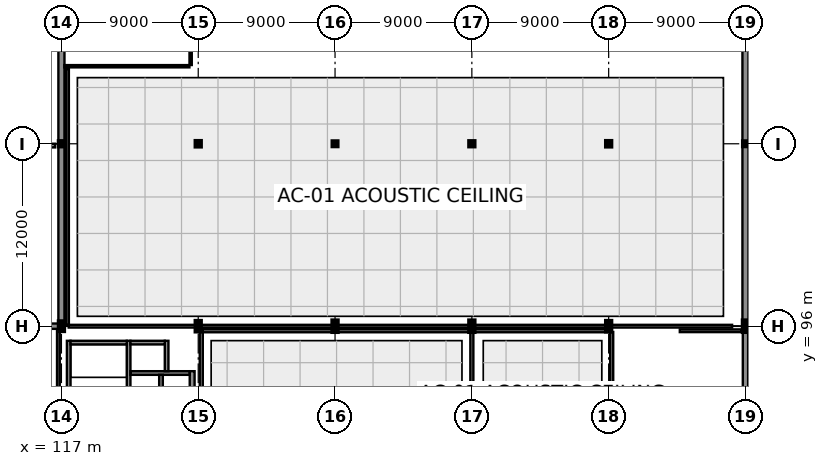
"""IFC4 building model, lengths in metres.
Left out: names, types, materials, properties, quantities, classifications, styles, units other than length and angle.
Written with IfcOpenShell. Run it as: python <this file> out.ifc"""

import sys

from ifc_helpers import new_model, si_unit, direction, frame, frame_2d, origin, origin_2d, place, context, subcontext, project, spatial, rectangle, i_section, extrude, element, fill, save


model = new_model("IFC4")
c1 = context("Model", 3, precision=1e-05, world=origin(), true_north=direction((0.0, 1.0)))
c2 = subcontext(c1, "Body", "Model", "MODEL_VIEW")
j1 = project(units=[si_unit("LENGTHUNIT", "METRE"), si_unit("PLANEANGLEUNIT", "RADIAN")], contexts=[c1])
p1 = place(None, origin())
s1 = spatial("IfcSite", under=j1, at=p1, CompositionType="ELEMENT")
p2 = place(p1, origin())
s2 = spatial("IfcBuilding", under=s1, at=p2, CompositionType="ELEMENT")
p3 = place(p2, origin())
s3 = spatial("IfcBuildingStorey", under=s2, at=p3, CompositionType="ELEMENT", Elevation=0.0)
p4 = place(p3, frame((117.0, 96.0, 0.0), z_axis=(0.0, 0.0, 1.0), x_axis=(1.0, 0.0, 0.0)))
e1 = element("IfcColumn", 1, at=p4, inside=s3, PredefinedType="COLUMN", context=c2, shape_type="SweptSolid", body=[
    extrude(i_section(OverallWidth=0.3, OverallDepth=0.6, WebThickness=0.015, FlangeThickness=0.03, at=origin_2d()), origin(), (0.0, 0.0, 1.0), 5.4),
])
p5 = place(p3, frame((117.0, 108.0, 0.0), z_axis=(0.0, 0.0, 1.0), x_axis=(1.0, 0.0, 0.0)))
e2 = element("IfcColumn", 2, at=p5, inside=s3, PredefinedType="COLUMN", context=c2, shape_type="SweptSolid", body=[
    extrude(i_section(OverallWidth=0.3, OverallDepth=0.3, WebThickness=0.011, FlangeThickness=0.019, at=origin_2d()), origin(), (0.0, 0.0, 1.0), 5.4),
])
p6 = place(p3, frame((126.0, 96.0, 0.0), z_axis=(0.0, 0.0, 1.0), x_axis=(0.0, 1.0, 0.0)))
e3 = element("IfcColumn", 3, at=p6, inside=s3, PredefinedType="COLUMN", context=c2, shape_type="SweptSolid", body=[
    extrude(i_section(OverallWidth=0.3, OverallDepth=0.65, WebThickness=0.016, FlangeThickness=0.031, at=origin_2d()), origin(), (0.0, 0.0, 1.0), 5.4),
])
p7 = place(p3, frame((126.0, 108.0, 0.0), z_axis=(0.0, 0.0, 1.0), x_axis=(1.0, 0.0, 0.0)))
e4 = element("IfcColumn", 4, at=p7, inside=s3, PredefinedType="COLUMN", context=c2, shape_type="SweptSolid", body=[
    extrude(i_section(OverallWidth=0.3, OverallDepth=0.32, WebThickness=0.011, FlangeThickness=0.021, at=origin_2d()), origin(), (0.0, 0.0, 1.0), 5.4),
])
p8 = place(p3, frame((135.0, 96.0, 0.0), z_axis=(0.0, 0.0, 1.0), x_axis=(1.0, 0.0, 0.0)))
e5 = element("IfcColumn", 5, at=p8, inside=s3, PredefinedType="COLUMN", context=c2, shape_type="SweptSolid", body=[
    extrude(i_section(OverallWidth=0.304, OverallDepth=0.716, WebThickness=0.021, FlangeThickness=0.04, at=origin_2d()), origin(), (0.0, 0.0, 1.0), 5.4),
])
p9 = place(p3, frame((135.0, 108.0, 0.0), z_axis=(0.0, 0.0, 1.0), x_axis=(1.0, 0.0, 0.0)))
e6 = element("IfcColumn", 6, at=p9, inside=s3, PredefinedType="COLUMN", context=c2, shape_type="SweptSolid", body=[
    extrude(i_section(OverallWidth=0.28, OverallDepth=0.28, WebThickness=0.01, FlangeThickness=0.018, at=origin_2d()), origin(), (0.0, 0.0, 1.0), 5.4),
])
p10 = place(p3, frame((144.0, 96.0, 0.0), z_axis=(0.0, 0.0, 1.0), x_axis=(1.0, 0.0, 0.0)))
e7 = element("IfcColumn", 7, at=p10, inside=s3, PredefinedType="COLUMN", context=c2, shape_type="SweptSolid", body=[
    extrude(i_section(OverallWidth=0.304, OverallDepth=0.716, WebThickness=0.021, FlangeThickness=0.04, at=origin_2d()), origin(), (0.0, 0.0, 1.0), 5.4),
])
p11 = place(p3, frame((144.0, 108.0, 0.0), z_axis=(0.0, 0.0, 1.0), x_axis=(1.0, 0.0, 0.0)))
e8 = element("IfcColumn", 8, at=p11, inside=s3, PredefinedType="COLUMN", context=c2, shape_type="SweptSolid", body=[
    extrude(i_section(OverallWidth=0.3, OverallDepth=0.3, WebThickness=0.011, FlangeThickness=0.019, at=origin_2d()), origin(), (0.0, 0.0, 1.0), 5.4),
])
p12 = place(p3, frame((153.0, 96.0, 0.0), z_axis=(0.0, 0.0, 1.0), x_axis=(1.0, 0.0, 0.0)))
e9 = element("IfcColumn", 9, at=p12, inside=s3, PredefinedType="COLUMN", context=c2, shape_type="SweptSolid", body=[
    extrude(i_section(OverallWidth=0.3, OverallDepth=0.65, WebThickness=0.016, FlangeThickness=0.031, at=origin_2d()), origin(), (0.0, 0.0, 1.0), 5.4),
])
p13 = place(p3, frame((153.0, 108.0, 0.0), z_axis=(0.0, 0.0, 1.0), x_axis=(0.0, 1.0, 0.0)))
e10 = element("IfcColumn", 10, at=p13, inside=s3, PredefinedType="COLUMN", context=c2, shape_type="SweptSolid", body=[
    extrude(i_section(OverallWidth=0.3, OverallDepth=0.32, WebThickness=0.011, FlangeThickness=0.021, at=origin_2d()), origin(), (0.0, 0.0, 1.0), 5.4),
])
p14 = place(p3, frame((162.0, 96.0, 0.0), z_axis=(0.0, 0.0, 1.0), x_axis=(1.0, 0.0, 0.0)))
e11 = element("IfcColumn", 11, at=p14, inside=s3, PredefinedType="COLUMN", context=c2, shape_type="SweptSolid", body=[
    extrude(i_section(OverallWidth=0.304, OverallDepth=0.716, WebThickness=0.021, FlangeThickness=0.04, at=origin_2d()), origin(), (0.0, 0.0, 1.0), 5.4),
])
p15 = place(p3, frame((162.0, 108.0, 0.0), z_axis=(0.0, 0.0, 1.0), x_axis=(1.0, 0.0, 0.0)))
e12 = element("IfcColumn", 12, at=p15, inside=s3, PredefinedType="COLUMN", context=c2, shape_type="SweptSolid", body=[
    extrude(i_section(OverallWidth=0.28, OverallDepth=0.28, WebThickness=0.01, FlangeThickness=0.018, at=origin_2d()), origin(), (0.0, 0.0, 1.0), 5.4),
])
p16 = place(p3, frame((162.0, 78.356, 0.0), z_axis=(0.0, 0.0, 1.0), x_axis=(0.0, 1.0, 0.0)))
e13 = element("IfcWall", 13, at=p16, inside=s3, PredefinedType="SOLIDWALL", context=c2, shape_type="SweptSolid", body=[
    extrude(rectangle(XDim=17.288, YDim=0.35, at=frame_2d((8.644, 0.0))), origin(), (0.0, 0.0, 1.0), 4.295),
])
p17 = place(p16, frame((5.244, 0.0, 0.0)))
e14 = element("IfcOpeningElement", 14, at=p17, cuts=e13, PredefinedType="OPENING", context=c2, shape_type="SweptSolid", body=[
    extrude(rectangle(XDim=1.8, YDim=2.4, at=frame_2d((0.9, 1.2))), frame((0.0, 0.19, 0.0), z_axis=(0.0, -1.0, 0.0), x_axis=(1.0, 0.0, 0.0)), (0.0, 0.0, 1.0), 0.38),
])
p18 = place(p3, frame((116.992, 96.0, 0.0), z_axis=(0.0, 0.0, 1.0), x_axis=(-1.0, 0.0, 0.0)))
e15 = element("IfcWall", 15, at=p18, inside=s3, PredefinedType="SOLIDWALL", context=c2, shape_type="SweptSolid", body=[
    extrude(rectangle(XDim=8.984, YDim=0.35, at=frame_2d((4.492, 0.0))), origin(), (0.0, 0.0, 1.0), 4.545),
])
p19 = place(p18, frame((1.792, 0.0, 0.0)))
e16 = element("IfcOpeningElement", 16, at=p19, cuts=e15, PredefinedType="OPENING", context=c2, shape_type="SweptSolid", body=[
    extrude(rectangle(XDim=2.0, YDim=2.5, at=frame_2d((1.0, 1.25))), frame((0.0, 0.19, 0.0), z_axis=(0.0, -1.0, 0.0), x_axis=(1.0, 0.0, 0.0)), (0.0, 0.0, 1.0), 0.38),
])
p20 = place(p3, frame((162.0, 96.356, 0.0), z_axis=(0.0, 0.0, 1.0), x_axis=(0.0, 1.0, 0.0)))
e17 = element("IfcWall", 17, at=p20, inside=s3, PredefinedType="SOLIDWALL", context=c2, shape_type="SweptSolid", body=[
    extrude(rectangle(XDim=11.506, YDim=0.4, at=frame_2d((5.753, 0.0))), origin(), (0.0, 0.0, 1.0), 5.08),
])
p21 = place(p20, frame((2.322, 0.0, 2.35)))
e18 = element("IfcOpeningElement", 18, at=p21, cuts=e17, PredefinedType="OPENING", context=c2, shape_type="SweptSolid", body=[
    extrude(rectangle(XDim=1.8, YDim=0.75, at=frame_2d((0.9, 0.375))), frame((0.0, 0.215, 0.0), z_axis=(0.0, -1.0, 0.0), x_axis=(1.0, 0.0, 0.0)), (0.0, 0.0, 1.0), 0.43),
])
p22 = place(p20, frame((7.384, 0.0, 2.35)))
e19 = element("IfcOpeningElement", 19, at=p22, cuts=e17, PredefinedType="OPENING", context=c2, shape_type="SweptSolid", body=[
    extrude(rectangle(XDim=1.8, YDim=0.75, at=frame_2d((0.9, 0.375))), frame((0.0, 0.215, 0.0), z_axis=(0.0, -1.0, 0.0), x_axis=(1.0, 0.0, 0.0)), (0.0, 0.0, 1.0), 0.43),
])
p23 = place(p3, frame((162.0, 108.138, 0.0), z_axis=(0.0, 0.0, 1.0), x_axis=(0.0, 1.0, 0.0)))
e20 = element("IfcWall", 20, at=p23, inside=s3, PredefinedType="SOLIDWALL", context=c2, shape_type="SweptSolid", body=[
    extrude(rectangle(XDim=11.714, YDim=0.4, at=frame_2d((5.857, 0.0))), origin(), (0.0, 0.0, 1.0), 5.08),
])
p24 = place(p23, frame((3.757, 0.0, 0.0)))
e21 = element("IfcOpeningElement", 21, at=p24, cuts=e20, PredefinedType="OPENING", context=c2, shape_type="SweptSolid", body=[
    extrude(rectangle(XDim=4.2, YDim=3.4, at=frame_2d((2.1, 1.7))), frame((0.0, 0.215, 0.0), z_axis=(0.0, -1.0, 0.0), x_axis=(1.0, 0.0, 0.0)), (0.0, 0.0, 1.0), 0.43),
])
p25 = place(p3, frame((117.0, 119.842, 0.0), z_axis=(0.0, 0.0, 1.0), x_axis=(0.0, -1.0, 0.0)))
e22 = element("IfcWall", 22, at=p25, inside=s3, PredefinedType="SOLIDWALL", context=c2, shape_type="SweptSolid", body=[
    extrude(rectangle(XDim=11.694, YDim=0.4, at=frame_2d((5.847, 0.0))), origin(), (0.0, 0.0, 1.0), 5.08),
])
p26 = place(p25, frame((2.908, 0.0, 2.35)))
e23 = element("IfcOpeningElement", 23, at=p26, cuts=e22, PredefinedType="OPENING", context=c2, shape_type="SweptSolid", body=[
    extrude(rectangle(XDim=1.2, YDim=0.7, at=frame_2d((0.6, 0.35))), frame((0.0, 0.215, 0.0), z_axis=(0.0, -1.0, 0.0), x_axis=(1.0, 0.0, 0.0)), (0.0, 0.0, 1.0), 0.43),
])
p27 = place(p25, frame((7.586, 0.0, 2.35)))
e24 = element("IfcOpeningElement", 24, at=p27, cuts=e22, PredefinedType="OPENING", context=c2, shape_type="SweptSolid", body=[
    extrude(rectangle(XDim=1.2, YDim=0.7, at=frame_2d((0.6, 0.35))), frame((0.0, 0.215, 0.0), z_axis=(0.0, -1.0, 0.0), x_axis=(1.0, 0.0, 0.0)), (0.0, 0.0, 1.0), 0.43),
])
p28 = place(p3, frame((117.0, 107.852, 0.0), z_axis=(0.0, 0.0, 1.0), x_axis=(0.0, -1.0, 0.0)))
e25 = element("IfcWall", 25, at=p28, inside=s3, PredefinedType="SOLIDWALL", context=c2, shape_type="SweptSolid", body=[
    extrude(rectangle(XDim=11.554, YDim=0.4, at=frame_2d((5.777, 0.0))), origin(), (0.0, 0.0, 1.0), 5.08),
])
p29 = place(p28, frame((2.716, 0.0, 2.35)))
e26 = element("IfcOpeningElement", 26, at=p29, cuts=e25, PredefinedType="OPENING", context=c2, shape_type="SweptSolid", body=[
    extrude(rectangle(XDim=1.5, YDim=0.75, at=frame_2d((0.75, 0.375))), frame((0.0, 0.215, 0.0), z_axis=(0.0, -1.0, 0.0), x_axis=(1.0, 0.0, 0.0)), (0.0, 0.0, 1.0), 0.43),
])
p30 = place(p28, frame((7.338, 0.0, 2.35)))
e27 = element("IfcOpeningElement", 27, at=p30, cuts=e25, PredefinedType="OPENING", context=c2, shape_type="SweptSolid", body=[
    extrude(rectangle(XDim=1.5, YDim=0.75, at=frame_2d((0.75, 0.375))), frame((0.0, 0.215, 0.0), z_axis=(0.0, -1.0, 0.0), x_axis=(1.0, 0.0, 0.0)), (0.0, 0.0, 1.0), 0.43),
])
p31 = place(p3, frame((108.06, 107.88, 0.0), z_axis=(0.0, 0.0, 1.0), x_axis=(1.0, 0.0, 0.0)))
e28 = element("IfcWall", 28, at=p31, inside=s3, PredefinedType="PARAPET", context=c2, shape_type="SweptSolid", body=[
    extrude(rectangle(XDim=8.52, YDim=0.24, at=frame_2d((4.26, 0.0))), origin(), (0.0, 0.0, 1.0), 0.9),
])
p32 = place(p3, frame((117.48, 86.76, 0.0), z_axis=(0.0, 0.0, 1.0), x_axis=(0.0, 1.0, 0.0)))
e29 = element("IfcWall", 29, at=p32, inside=s3, PredefinedType="SHEAR", context=c2, shape_type="SweptSolid", body=[
    extrude(rectangle(XDim=8.28, YDim=0.24, at=frame_2d((4.14, 0.0))), origin(), (0.0, 0.0, 1.0), 5.21),
])
p33 = place(p3, frame((121.42, 86.76, 0.0), z_axis=(0.0, 0.0, 1.0), x_axis=(0.0, 1.0, 0.0)))
e30 = element("IfcWall", 30, at=p33, inside=s3, PredefinedType="SHEAR", context=c2, shape_type="SweptSolid", body=[
    extrude(rectangle(XDim=8.28, YDim=0.24, at=frame_2d((4.14, 0.0))), origin(), (0.0, 0.0, 1.0), 5.21),
])
p34 = place(p33, frame((0.54, 0.0, 0.0)))
e31 = element("IfcOpeningElement", 31, at=p34, cuts=e30, PredefinedType="OPENING", context=c2, shape_type="SweptSolid", body=[
    extrude(rectangle(XDim=1.2, YDim=2.15, at=frame_2d((0.6, 1.075))), frame((0.0, 0.135, 0.0), z_axis=(0.0, -1.0, 0.0), x_axis=(1.0, 0.0, 0.0)), (0.0, 0.0, 1.0), 0.27),
])
p35 = place(p3, frame((117.6, 94.92, 0.0), z_axis=(0.0, 0.0, 1.0), x_axis=(1.0, 0.0, 0.0)))
e32 = element("IfcWall", 32, at=p35, inside=s3, PredefinedType="SHEAR", context=c2, shape_type="SweptSolid", body=[
    extrude(rectangle(XDim=3.7, YDim=0.24, at=frame_2d((1.85, 0.0))), origin(), (0.0, 0.0, 1.0), 5.21),
])
p36 = place(p3, frame((125.6, 84.0, 0.0), z_axis=(0.0, 0.0, 1.0), x_axis=(0.0, 1.0, 0.0)))
e33 = element("IfcWall", 33, at=p36, inside=s3, PredefinedType="SHEAR", context=c2, shape_type="SweptSolid", body=[
    extrude(rectangle(XDim=9.04, YDim=0.32, at=frame_2d((4.52, 0.0))), origin(), (0.0, 0.0, 1.0), 5.06),
])
p37 = place(p3, frame((121.54, 92.92, 0.0), z_axis=(0.0, 0.0, 1.0), x_axis=(1.0, 0.0, 0.0)))
e34 = element("IfcWall", 34, at=p37, inside=s3, PredefinedType="SHEAR", context=c2, shape_type="SweptSolid", body=[
    extrude(rectangle(XDim=3.9, YDim=0.24, at=frame_2d((1.95, 0.0))), origin(), (0.0, 0.0, 1.0), 5.21),
])
p38 = place(p3, frame((123.55, 89.9, 0.0), z_axis=(0.0, 0.0, 1.0), x_axis=(0.0, 1.0, 0.0)))
e35 = element("IfcWall", 35, at=p38, inside=s3, PredefinedType="SHEAR", context=c2, shape_type="SweptSolid", body=[
    extrude(rectangle(XDim=2.9, YDim=0.24, at=frame_2d((1.45, 0.0))), origin(), (0.0, 0.0, 1.0), 5.21),
])
p39 = place(p3, frame((123.92, 93.04, 0.0), z_axis=(0.0, 0.0, 1.0), x_axis=(0.0, 1.0, 0.0)))
e36 = element("IfcWall", 36, at=p39, inside=s3, PredefinedType="SHEAR", context=c2, shape_type="SweptSolid", body=[
    extrude(rectangle(XDim=2.0, YDim=0.24, at=frame_2d((1.0, 0.0))), origin(), (0.0, 0.0, 1.0), 5.21),
])
p40 = place(p3, frame((121.54, 94.92, 0.0), z_axis=(0.0, 0.0, 1.0), x_axis=(1.0, 0.0, 0.0)))
e37 = element("IfcWall", 37, at=p40, inside=s3, PredefinedType="SHEAR", context=c2, shape_type="SweptSolid", body=[
    extrude(rectangle(XDim=2.26, YDim=0.24, at=frame_2d((1.13, 0.0))), origin(), (0.0, 0.0, 1.0), 5.21),
])
p41 = place(p3, frame((116.8, 95.72, 0.0), z_axis=(0.0, 0.0, 1.0), x_axis=(0.0, -1.0, 0.0)))
e38 = element("IfcWall", 38, at=p41, inside=s3, PredefinedType="PARTITIONING", context=c2, shape_type="SweptSolid", body=[
    extrude(rectangle(XDim=11.64, YDim=0.18, at=frame_2d((5.82, 0.0))), origin(), (0.0, 0.0, 1.0), 4.295),
])
p42 = place(p3, frame((157.68, 95.7, 0.0), z_axis=(0.0, 0.0, 1.0), x_axis=(1.0, 0.0, 0.0)))
e39 = element("IfcWall", 39, at=p42, inside=s3, PredefinedType="PARTITIONING", context=c2, shape_type="SweptSolid", body=[
    extrude(rectangle(XDim=4.04, YDim=0.18, at=frame_2d((2.02, 0.0))), origin(), (0.0, 0.0, 1.0), 5.04),
])
p43 = place(p3, frame((126.28, 95.7, 0.0), z_axis=(0.0, 0.0, 1.0), x_axis=(1.0, 0.0, 0.0)))
e40 = element("IfcWall", 40, at=p43, inside=s3, PredefinedType="PARTITIONING", context=c2, shape_type="SweptSolid", body=[
    extrude(rectangle(XDim=17.64, YDim=0.2, at=frame_2d((8.82, 0.0))), origin(), (0.0, 0.0, 1.0), 5.04),
])
p44 = place(p3, frame((144.0, 95.62, 0.0), z_axis=(0.0, 0.0, 1.0), x_axis=(0.0, -1.0, 0.0)))
e41 = element("IfcWall", 41, at=p44, inside=s3, PredefinedType="PARTITIONING", context=c2, shape_type="SweptSolid", body=[
    extrude(rectangle(XDim=13.64, YDim=0.2, at=frame_2d((6.82, 0.0))), origin(), (0.0, 0.0, 1.0), 4.405),
])
p45 = place(p3, frame((126.2, 81.98, 0.0), z_axis=(0.0, 0.0, 1.0), x_axis=(0.0, 1.0, 0.0)))
e42 = element("IfcWall", 42, at=p45, inside=s3, PredefinedType="PARTITIONING", context=c2, shape_type="SweptSolid", body=[
    extrude(rectangle(XDim=13.64, YDim=0.2, at=frame_2d((6.82, 0.0))), origin(), (0.0, 0.0, 1.0), 4.445),
])
p46 = place(p3, frame((153.2, 95.62, 0.0), z_axis=(0.0, 0.0, 1.0), x_axis=(0.0, -1.0, 0.0)))
e43 = element("IfcWall", 43, at=p46, inside=s3, PredefinedType="PARTITIONING", context=c2, shape_type="SweptSolid", body=[
    extrude(rectangle(XDim=13.64, YDim=0.2, at=frame_2d((6.82, 0.0))), origin(), (0.0, 0.0, 1.0), 4.305),
])
p47 = place(p3, frame((144.18, 95.7, 0.0), z_axis=(0.0, 0.0, 1.0), x_axis=(1.0, 0.0, 0.0)))
e44 = element("IfcWall", 44, at=p47, inside=s3, PredefinedType="PARTITIONING", context=c2, shape_type="SweptSolid", body=[
    extrude(rectangle(XDim=8.94, YDim=0.2, at=frame_2d((4.47, 0.0))), origin(), (0.0, 0.0, 1.0), 5.04),
])
p48 = place(p3, frame((117.4, 96.08, 0.0), z_axis=(0.0, 0.0, 1.0), x_axis=(0.0, 1.0, 0.0)))
e45 = element("IfcWall", 45, at=p48, inside=s3, PredefinedType="PARTITIONING", context=c2, shape_type="SweptSolid", body=[
    extrude(rectangle(XDim=16.84, YDim=0.18, at=frame_2d((8.42, 0.0))), origin(), (0.0, 0.0, 1.0), 5.04),
])
p49 = place(p3, frame((161.12, 96.0, 0.0), z_axis=(0.0, 0.0, 1.0), x_axis=(-1.0, 0.0, 0.0)))
e46 = element("IfcWall", 46, at=p49, inside=s3, PredefinedType="PARTITIONING", context=c2, shape_type="SweptSolid", body=[
    extrude(rectangle(XDim=35.04, YDim=0.18, at=frame_2d((17.52, 0.0))), origin(), (0.0, 0.0, 1.0), 4.545),
])
p50 = place(p49, frame((5.732, 0.0, 0.0)))
e47 = element("IfcOpeningElement", 47, at=p50, cuts=e46, PredefinedType="OPENING", context=c2, shape_type="SweptSolid", body=[
    extrude(rectangle(XDim=1.15, YDim=2.15, at=frame_2d((0.575, 1.075))), frame((0.0, 0.105, 0.0), z_axis=(0.0, -1.0, 0.0), x_axis=(1.0, 0.0, 0.0)), (0.0, 0.0, 1.0), 0.21),
])
p51 = place(p3, frame((125.92, 96.0, 0.0), z_axis=(0.0, 0.0, 1.0), x_axis=(-1.0, 0.0, 0.0)))
e48 = element("IfcWall", 48, at=p51, inside=s3, PredefinedType="PARTITIONING", context=c2, shape_type="SweptSolid", body=[
    extrude(rectangle(XDim=8.44, YDim=0.18, at=frame_2d((4.22, 0.0))), origin(), (0.0, 0.0, 1.0), 4.545),
])
p52 = place(p3, frame((125.5, 119.805, 0.0), z_axis=(0.0, 0.0, 1.0), x_axis=(0.0, -1.0, 0.0)))
e49 = element("IfcWall", 49, at=p52, inside=s3, PredefinedType="PARTITIONING", context=c2, shape_type="SweptSolid", body=[
    extrude(rectangle(XDim=6.625, YDim=0.15, at=frame_2d((3.312, 0.0))), origin(), (0.0, 0.0, 1.0), 5.04),
])
p53 = place(p52, frame((2.788, 0.0, 0.0)))
e50 = element("IfcOpeningElement", 50, at=p53, cuts=e49, PredefinedType="OPENING", context=c2, shape_type="SweptSolid", body=[
    extrude(rectangle(XDim=1.05, YDim=2.25, at=frame_2d((0.525, 1.125))), frame((0.0, 0.09, 0.0), z_axis=(0.0, -1.0, 0.0), x_axis=(1.0, 0.0, 0.0)), (0.0, 0.0, 1.0), 0.18),
])
p54 = place(p3, frame((125.42, 113.1, 0.0), z_axis=(0.0, 0.0, 1.0), x_axis=(-1.0, 0.0, 0.0)))
e51 = element("IfcWall", 51, at=p54, inside=s3, PredefinedType="PARTITIONING", context=c2, shape_type="SweptSolid", body=[
    extrude(rectangle(XDim=8.225, YDim=0.15, at=frame_2d((4.112, 0.0))), origin(), (0.0, 0.0, 1.0), 5.04),
])
p55 = place(p24, frame((4.2, 0.0, 0.0), z_axis=(0.0, 0.0, 1.0), x_axis=(-1.0, 0.0, 0.0)))
e52 = element("IfcDoor", 52, at=p55, inside=s3, OperationType="ROLLINGUP", PredefinedType="GATE", context=c2, shape_type="SweptSolid", body=[
    extrude(rectangle(XDim=4.2, YDim=3.4, at=frame_2d((2.1, 1.7))), frame((0.0, 0.025, 0.0), z_axis=(0.0, -1.0, 0.0), x_axis=(1.0, 0.0, 0.0)), (0.0, 0.0, 1.0), 0.05),
])
fill(e21, e52)
p56 = place(p21, origin())
e53 = element("IfcWindow", 53, at=p56, inside=s3, PartitioningType="SINGLE_PANEL", PredefinedType="WINDOW", context=c2, shape_type="SweptSolid", body=[
    extrude(rectangle(XDim=1.8, YDim=0.75, at=frame_2d((0.9, 0.375))), frame((0.0, 0.03, 0.0), z_axis=(0.0, -1.0, 0.0), x_axis=(1.0, 0.0, 0.0)), (0.0, 0.0, 1.0), 0.06),
])
fill(e18, e53)
p57 = place(p22, origin())
e54 = element("IfcWindow", 54, at=p57, inside=s3, PartitioningType="SINGLE_PANEL", PredefinedType="WINDOW", context=c2, shape_type="SweptSolid", body=[
    extrude(rectangle(XDim=1.8, YDim=0.75, at=frame_2d((0.9, 0.375))), frame((0.0, 0.03, 0.0), z_axis=(0.0, -1.0, 0.0), x_axis=(1.0, 0.0, 0.0)), (0.0, 0.0, 1.0), 0.06),
])
fill(e19, e54)
p58 = place(p27, origin())
e55 = element("IfcWindow", 55, at=p58, inside=s3, PartitioningType="SINGLE_PANEL", PredefinedType="WINDOW", context=c2, shape_type="SweptSolid", body=[
    extrude(rectangle(XDim=1.2, YDim=0.7, at=frame_2d((0.6, 0.35))), frame((0.0, 0.03, 0.0), z_axis=(0.0, -1.0, 0.0), x_axis=(1.0, 0.0, 0.0)), (0.0, 0.0, 1.0), 0.06),
])
fill(e24, e55)
p59 = place(p29, origin())
e56 = element("IfcWindow", 56, at=p59, inside=s3, PartitioningType="SINGLE_PANEL", PredefinedType="WINDOW", context=c2, shape_type="SweptSolid", body=[
    extrude(rectangle(XDim=1.5, YDim=0.75, at=frame_2d((0.75, 0.375))), frame((0.0, 0.03, 0.0), z_axis=(0.0, -1.0, 0.0), x_axis=(1.0, 0.0, 0.0)), (0.0, 0.0, 1.0), 0.06),
])
fill(e26, e56)
p60 = place(p30, origin())
e57 = element("IfcWindow", 57, at=p60, inside=s3, PartitioningType="SINGLE_PANEL", PredefinedType="WINDOW", context=c2, shape_type="SweptSolid", body=[
    extrude(rectangle(XDim=1.5, YDim=0.75, at=frame_2d((0.75, 0.375))), frame((0.0, 0.03, 0.0), z_axis=(0.0, -1.0, 0.0), x_axis=(1.0, 0.0, 0.0)), (0.0, 0.0, 1.0), 0.06),
])
fill(e27, e57)
p61 = place(p50, frame((1.15, 0.0, 0.0), z_axis=(0.0, 0.0, 1.0), x_axis=(-1.0, 0.0, 0.0)))
e58 = element("IfcDoor", 58, at=p61, inside=s3, OperationType="SINGLE_SWING_LEFT", PredefinedType="DOOR", context=c2, shape_type="SweptSolid", body=[
    extrude(rectangle(XDim=1.15, YDim=2.15, at=frame_2d((0.575, 1.075))), frame((0.0, 0.025, 0.0), z_axis=(0.0, -1.0, 0.0), x_axis=(1.0, 0.0, 0.0)), (0.0, 0.0, 1.0), 0.05),
])
fill(e47, e58)
save(model, sys.argv[1])
